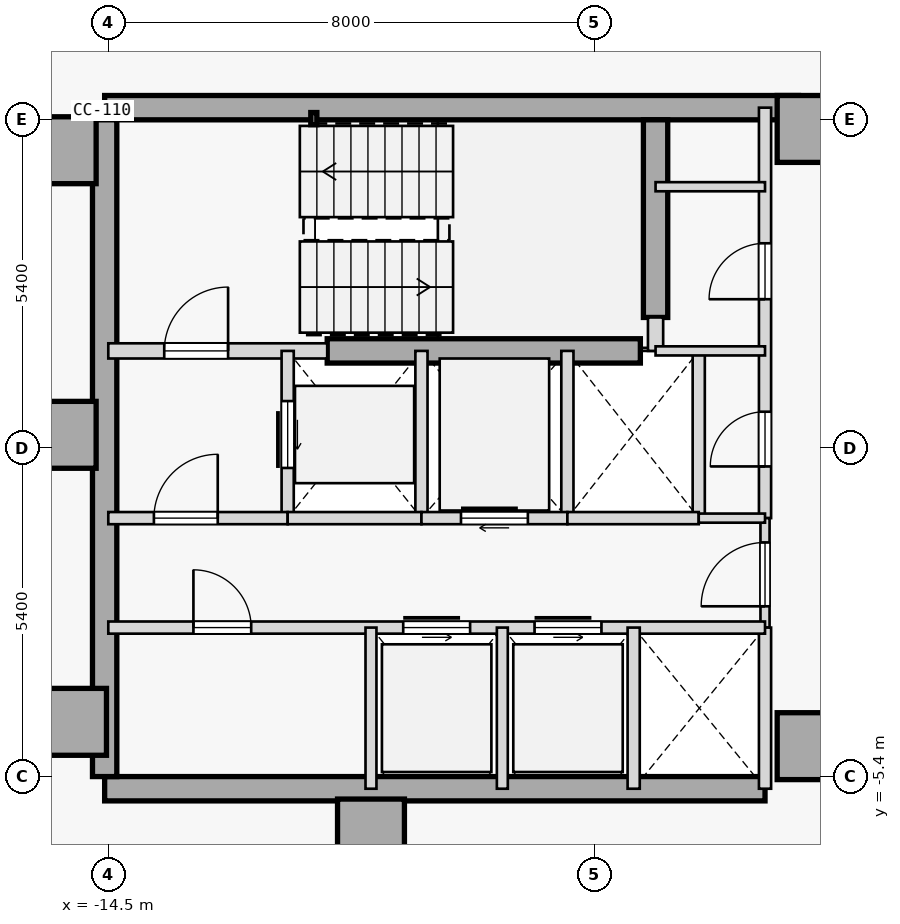
"""IFC4 building model, lengths in metres.
Left out: names, types, materials, properties, quantities, classifications, styles, units other than length and angle.
Written with IfcOpenShell. Run it as: python <this file> out.ifc"""

import sys

from ifc_helpers import new_model, si_unit, direction, frame, frame_2d, origin, origin_2d, place, context, subcontext, project, spatial, rectangle, hollow_rectangle, extrude, element, fill, save


model = new_model("IFC4")
c1 = context("Model", 3, precision=1e-05, world=origin(), true_north=direction((0.0, 1.0)))
c2 = subcontext(c1, "Body", "Model", "MODEL_VIEW")
j1 = project(units=[si_unit("LENGTHUNIT", "METRE"), si_unit("PLANEANGLEUNIT", "RADIAN")], contexts=[c1])
p1 = place(None, origin())
s1 = spatial("IfcSite", under=j1, at=p1, CompositionType="ELEMENT")
p2 = place(p1, origin())
s2 = spatial("IfcBuilding", under=s1, at=p2, CompositionType="ELEMENT")
p3 = place(p2, frame((0.0, 0.0, 171.8)))
s3 = spatial("IfcBuildingStorey", under=s2, at=p3, CompositionType="ELEMENT", Elevation=171.8)
for number, where, z_axis, x_axis in (
    (1, (-15.25, 4.9, 0.0), (0.0, 0.0, 1.0), (1.0, 0.0, 0.0)),
    (2, (-15.25, 0.22, 0.0), (0.0, 0.0, 1.0), (1.0, 0.0, 0.0)),
    (3, (-15.08, -4.5, 0.0), (0.0, 0.0, 1.0), (1.0, 0.0, 0.0)),
    (4, (-10.18, -6.32, 0.0), (0.0, 0.0, 1.0), (1.0, 0.0, 0.0)),
    (5, (-2.95, -4.9, 0.0), (0.0, 0.0, 1.0), (1.0, 0.0, 0.0)),
    (6, (-2.95, 5.25, 0.0), (0.0, 0.0, 1.0), (1.0, 0.0, 0.0)),
):
    element("IfcColumn", number, at=place(p3, frame(where, z_axis=z_axis, x_axis=x_axis)), inside=s3, PredefinedType="COLUMN", context=c2, shape_type="SweptSolid", body=[
        extrude(rectangle(XDim=1.1, YDim=1.1, at=origin_2d()), origin(), (0.0, 0.0, 1.0), 3.4),
    ])
p4 = place(p3, frame((-14.56, 5.6, 0.0), z_axis=(0.0, 0.0, 1.0), x_axis=(1.0, 0.0, 0.0)))
e7 = element("IfcWall", 7, at=p4, inside=s3, PredefinedType="SHEAR", context=c2, shape_type="SweptSolid", body=[
    extrude(rectangle(XDim=11.41, YDim=0.4, at=frame_2d((5.705, 0.0))), origin(), (0.0, 0.0, 1.0), 3.175),
])
p5 = place(p3, frame((-14.56, -5.6, 0.0), z_axis=(0.0, 0.0, 1.0), x_axis=(1.0, 0.0, 0.0)))
e8 = element("IfcWall", 8, at=p5, inside=s3, PredefinedType="SHEAR", context=c2, shape_type="SweptSolid", body=[
    extrude(rectangle(XDim=10.86, YDim=0.4, at=frame_2d((5.43, 0.0))), origin(), (0.0, 0.0, 1.0), 3.175),
])
p6 = place(p3, frame((-14.56, -5.4, 0.0), z_axis=(0.0, 0.0, 1.0), x_axis=(0.0, 1.0, 0.0)))
e9 = element("IfcWall", 9, at=p6, inside=s3, PredefinedType="SHEAR", context=c2, shape_type="SweptSolid", body=[
    extrude(rectangle(XDim=10.8, YDim=0.4, at=frame_2d((5.4, 0.0))), origin(), (0.0, 0.0, 1.0), 3.175),
])
p7 = place(p3, frame((-5.5, 2.15, 0.0), z_axis=(0.0, 0.0, 1.0), x_axis=(0.0, 1.0, 0.0)))
e10 = element("IfcWall", 10, at=p7, inside=s3, PredefinedType="SHEAR", context=c2, shape_type="SweptSolid", body=[
    extrude(rectangle(XDim=3.25, YDim=0.4, at=frame_2d((1.625, 0.0))), origin(), (0.0, 0.0, 1.0), 3.175),
])
p8 = place(p3, frame((-10.9, 1.6, 0.0), z_axis=(0.0, 0.0, 1.0), x_axis=(1.0, 0.0, 0.0)))
e11 = element("IfcWall", 11, at=p8, inside=s3, PredefinedType="SHEAR", context=c2, shape_type="SweptSolid", body=[
    extrude(rectangle(XDim=5.15, YDim=0.4, at=frame_2d((2.575, 0.0))), origin(), (0.0, 0.0, 1.0), 3.175),
])
p9 = place(p3, frame((-11.12, 5.42, 0.0), z_axis=(0.0, 0.0, 1.0), x_axis=(1.0, 0.0, 0.0)))
e12 = element("IfcColumn", 12, at=p9, inside=s3, PredefinedType="COLUMN", context=c2, shape_type="SweptSolid", body=[
    extrude(hollow_rectangle(XDim=0.1, YDim=0.2, WallThickness=0.008, at=origin_2d()), origin(), (0.0, 0.0, 1.0), 3.4),
])
p10 = place(p3, frame((-14.5, 1.6, 0.0), z_axis=(0.0, 0.0, 1.0), x_axis=(1.0, 0.0, 0.0)))
e13 = element("IfcWall", 13, at=p10, inside=s3, PredefinedType="STANDARD", context=c2, shape_type="SweptSolid", body=[
    extrude(rectangle(XDim=3.6, YDim=0.25, at=frame_2d((1.8, 0.0))), origin(), (0.0, 0.0, 1.0), 3.175),
])
p11 = place(p10, frame((0.92, 0.0, 0.0)))
e14 = element("IfcOpeningElement", 14, at=p11, cuts=e13, PredefinedType="OPENING", context=c2, shape_type="SweptSolid", body=[
    extrude(rectangle(XDim=1.05, YDim=2.15, at=frame_2d((0.525, 1.075))), frame((0.0, 0.135, 0.0), z_axis=(0.0, -1.0, 0.0), x_axis=(1.0, 0.0, 0.0)), (0.0, 0.0, 1.0), 0.27),
])
p12 = place(p3, frame((-5.5, 1.6, 0.0), z_axis=(0.0, 0.0, 1.0), x_axis=(0.0, 1.0, 0.0)))
e15 = element("IfcWall", 15, at=p12, inside=s3, PredefinedType="STANDARD", context=c2, shape_type="SweptSolid", body=[
    extrude(rectangle(XDim=0.55, YDim=0.25, at=frame_2d((0.275, 0.0))), origin(), (0.0, 0.0, 1.0), 3.175),
])
p13 = place(p3, frame((-3.7, -1.15, 0.0), z_axis=(0.0, 0.0, 1.0), x_axis=(0.0, 1.0, 0.0)))
e16 = element("IfcWall", 16, at=p13, inside=s3, PredefinedType="STANDARD", context=c2, shape_type="SweptSolid", body=[
    extrude(rectangle(XDim=6.75, YDim=0.2, at=frame_2d((3.375, 0.0))), origin(), (0.0, 0.0, 1.0), 3.175),
])
p14 = place(p13, frame((3.6, 0.0, 0.0)))
e17 = element("IfcOpeningElement", 17, at=p14, cuts=e16, PredefinedType="OPENING", context=c2, shape_type="SweptSolid", body=[
    extrude(rectangle(XDim=0.92, YDim=2.15, at=frame_2d((0.46, 1.075))), frame((0.0, 0.11, 0.0), z_axis=(0.0, -1.0, 0.0), x_axis=(1.0, 0.0, 0.0)), (0.0, 0.0, 1.0), 0.22),
])
p15 = place(p13, frame((0.85, 0.0, 0.0)))
e18 = element("IfcOpeningElement", 18, at=p15, cuts=e16, PredefinedType="OPENING", context=c2, shape_type="SweptSolid", body=[
    extrude(rectangle(XDim=0.9, YDim=2.15, at=frame_2d((0.45, 1.075))), frame((0.0, 0.11, 0.0), z_axis=(0.0, -1.0, 0.0), x_axis=(1.0, 0.0, 0.0)), (0.0, 0.0, 1.0), 0.22),
])
p16 = place(p3, frame((-3.7, -2.95, 0.0), z_axis=(0.0, 0.0, 1.0), x_axis=(0.0, 1.0, 0.0)))
e19 = element("IfcWall", 19, at=p16, inside=s3, PredefinedType="PARTITIONING", context=c2, shape_type="SweptSolid", body=[
    extrude(rectangle(XDim=1.8, YDim=0.15, at=frame_2d((0.9, 0.0))), origin(), (0.0, 0.0, 1.0), 3.175),
])
p17 = place(p16, frame((0.35, 0.0, 0.0)))
e20 = element("IfcOpeningElement", 20, at=p17, cuts=e19, PredefinedType="OPENING", context=c2, shape_type="SweptSolid", body=[
    extrude(rectangle(XDim=1.05, YDim=2.18, at=frame_2d((0.525, 1.09))), frame((0.0, 0.085, 0.0), z_axis=(0.0, -1.0, 0.0), x_axis=(1.0, 0.0, 0.0)), (0.0, 0.0, 1.0), 0.17),
])
p18 = place(p3, frame((-3.7, -5.6, 0.0), z_axis=(0.0, 0.0, 1.0), x_axis=(0.0, 1.0, 0.0)))
e21 = element("IfcWall", 21, at=p18, inside=s3, PredefinedType="STANDARD", context=c2, shape_type="SweptSolid", body=[
    extrude(rectangle(XDim=2.65, YDim=0.2, at=frame_2d((1.325, 0.0))), origin(), (0.0, 0.0, 1.0), 3.175),
])
p19 = place(p3, frame((-11.55, -1.15, 0.0), z_axis=(0.0, 0.0, 1.0), x_axis=(0.0, 1.0, 0.0)))
e22 = element("IfcWall", 22, at=p19, inside=s3, PredefinedType="STANDARD", context=c2, shape_type="SweptSolid", body=[
    extrude(rectangle(XDim=2.75, YDim=0.2, at=frame_2d((1.375, 0.0))), origin(), (0.0, 0.0, 1.0), 3.175),
])
p20 = place(p19, frame((0.825, 0.0, 0.0)))
e23 = element("IfcOpeningElement", 23, at=p20, cuts=e22, PredefinedType="OPENING", context=c2, shape_type="SweptSolid", body=[
    extrude(rectangle(XDim=1.1, YDim=2.15, at=frame_2d((0.55, 1.075))), frame((0.0, 0.11, 0.0), z_axis=(0.0, -1.0, 0.0), x_axis=(1.0, 0.0, 0.0)), (0.0, 0.0, 1.0), 0.22),
])
p21 = place(p3, frame((-9.35, -1.15, 0.0), z_axis=(0.0, 0.0, 1.0), x_axis=(0.0, 1.0, 0.0)))
e24 = element("IfcWall", 24, at=p21, inside=s3, PredefinedType="STANDARD", context=c2, shape_type="SweptSolid", body=[
    extrude(rectangle(XDim=2.75, YDim=0.2, at=frame_2d((1.375, 0.0))), origin(), (0.0, 0.0, 1.0), 3.175),
])
p22 = place(p3, frame((-14.5, -1.15, 0.0), z_axis=(0.0, 0.0, 1.0), x_axis=(1.0, 0.0, 0.0)))
e25 = element("IfcWall", 25, at=p22, inside=s3, PredefinedType="STANDARD", context=c2, shape_type="SweptSolid", body=[
    extrude(rectangle(XDim=2.95, YDim=0.2, at=frame_2d((1.475, 0.0))), origin(), (0.0, 0.0, 1.0), 3.175),
])
p23 = place(p22, frame((0.75, 0.0, 0.0)))
e26 = element("IfcOpeningElement", 26, at=p23, cuts=e25, PredefinedType="OPENING", context=c2, shape_type="SweptSolid", body=[
    extrude(rectangle(XDim=1.05, YDim=2.18, at=frame_2d((0.525, 1.09))), frame((0.0, 0.11, 0.0), z_axis=(0.0, -1.0, 0.0), x_axis=(1.0, 0.0, 0.0)), (0.0, 0.0, 1.0), 0.22),
])
p24 = place(p3, frame((-11.55, -1.15, 0.0), z_axis=(0.0, 0.0, 1.0), x_axis=(1.0, 0.0, 0.0)))
e27 = element("IfcWall", 27, at=p24, inside=s3, PredefinedType="STANDARD", context=c2, shape_type="SweptSolid", body=[
    extrude(rectangle(XDim=2.2, YDim=0.2, at=frame_2d((1.1, 0.0))), origin(), (0.0, 0.0, 1.0), 3.175),
])
p25 = place(p3, frame((-6.95, -1.15, 0.0), z_axis=(0.0, 0.0, 1.0), x_axis=(0.0, 1.0, 0.0)))
e28 = element("IfcWall", 28, at=p25, inside=s3, PredefinedType="STANDARD", context=c2, shape_type="SweptSolid", body=[
    extrude(rectangle(XDim=2.75, YDim=0.2, at=frame_2d((1.375, 0.0))), origin(), (0.0, 0.0, 1.0), 3.175),
])
p26 = place(p3, frame((-9.35, -1.15, 0.0), z_axis=(0.0, 0.0, 1.0), x_axis=(1.0, 0.0, 0.0)))
e29 = element("IfcWall", 29, at=p26, inside=s3, PredefinedType="STANDARD", context=c2, shape_type="SweptSolid", body=[
    extrude(rectangle(XDim=2.4, YDim=0.2, at=frame_2d((1.2, 0.0))), origin(), (0.0, 0.0, 1.0), 3.175),
])
p27 = place(p26, frame((0.65, 0.0, 0.0)))
e30 = element("IfcOpeningElement", 30, at=p27, cuts=e29, PredefinedType="OPENING", context=c2, shape_type="SweptSolid", body=[
    extrude(rectangle(XDim=1.1, YDim=2.15, at=frame_2d((0.55, 1.075))), frame((0.0, 0.11, 0.0), z_axis=(0.0, -1.0, 0.0), x_axis=(1.0, 0.0, 0.0)), (0.0, 0.0, 1.0), 0.22),
])
p28 = place(p3, frame((-4.79, -1.15, 0.0), z_axis=(0.0, 0.0, 1.0), x_axis=(0.0, 1.0, 0.0)))
e31 = element("IfcWall", 31, at=p28, inside=s3, PredefinedType="STANDARD", context=c2, shape_type="SweptSolid", body=[
    extrude(rectangle(XDim=2.75, YDim=0.2, at=frame_2d((1.375, 0.0))), origin(), (0.0, 0.0, 1.0), 3.175),
])
p29 = place(p3, frame((-6.95, -1.15, 0.0), z_axis=(0.0, 0.0, 1.0), x_axis=(1.0, 0.0, 0.0)))
e32 = element("IfcWall", 32, at=p29, inside=s3, PredefinedType="STANDARD", context=c2, shape_type="SweptSolid", body=[
    extrude(rectangle(XDim=2.16, YDim=0.2, at=frame_2d((1.08, 0.0))), origin(), (0.0, 0.0, 1.0), 3.175),
])
p30 = place(p3, frame((-4.79, -1.15, 0.0), z_axis=(0.0, 0.0, 1.0), x_axis=(1.0, 0.0, 0.0)))
e33 = element("IfcWall", 33, at=p30, inside=s3, PredefinedType="PARTITIONING", context=c2, shape_type="SweptSolid", body=[
    extrude(rectangle(XDim=1.09, YDim=0.15, at=frame_2d((0.545, 0.0))), origin(), (0.0, 0.0, 1.0), 3.175),
])
p31 = place(p3, frame((-14.5, -2.95, 0.0), z_axis=(0.0, 0.0, 1.0), x_axis=(1.0, 0.0, 0.0)))
e34 = element("IfcWall", 34, at=p31, inside=s3, PredefinedType="STANDARD", context=c2, shape_type="SweptSolid", body=[
    extrude(rectangle(XDim=10.8, YDim=0.2, at=frame_2d((5.4, 0.0))), origin(), (0.0, 0.0, 1.0), 3.175),
])
p32 = place(p31, frame((4.85, 0.0, 0.0)))
e35 = element("IfcOpeningElement", 35, at=p32, cuts=e34, PredefinedType="OPENING", context=c2, shape_type="SweptSolid", body=[
    extrude(rectangle(XDim=1.1, YDim=2.15, at=frame_2d((0.55, 1.075))), frame((0.0, 0.11, 0.0), z_axis=(0.0, -1.0, 0.0), x_axis=(1.0, 0.0, 0.0)), (0.0, 0.0, 1.0), 0.22),
])
p33 = place(p31, frame((7.01, 0.0, 0.0)))
e36 = element("IfcOpeningElement", 36, at=p33, cuts=e34, PredefinedType="OPENING", context=c2, shape_type="SweptSolid", body=[
    extrude(rectangle(XDim=1.1, YDim=2.15, at=frame_2d((0.55, 1.075))), frame((0.0, 0.11, 0.0), z_axis=(0.0, -1.0, 0.0), x_axis=(1.0, 0.0, 0.0)), (0.0, 0.0, 1.0), 0.22),
])
p34 = place(p31, frame((1.4, 0.0, 0.0)))
e37 = element("IfcOpeningElement", 37, at=p34, cuts=e34, PredefinedType="OPENING", context=c2, shape_type="SweptSolid", body=[
    extrude(rectangle(XDim=0.95, YDim=2.15, at=frame_2d((0.475, 1.075))), frame((0.0, 0.11, 0.0), z_axis=(0.0, -1.0, 0.0), x_axis=(1.0, 0.0, 0.0)), (0.0, 0.0, 1.0), 0.22),
])
p35 = place(p3, frame((-5.86, -5.6, 0.0), z_axis=(0.0, 0.0, 1.0), x_axis=(0.0, 1.0, 0.0)))
e38 = element("IfcWall", 38, at=p35, inside=s3, PredefinedType="STANDARD", context=c2, shape_type="SweptSolid", body=[
    extrude(rectangle(XDim=2.65, YDim=0.2, at=frame_2d((1.325, 0.0))), origin(), (0.0, 0.0, 1.0), 3.175),
])
for number, where, z_axis, x_axis in (
    (39, (-10.18, -5.6, 0.0), (0.0, 0.0, 1.0), (0.0, 1.0, 0.0)),
    (40, (-8.02, -5.6, 0.0), (0.0, 0.0, 1.0), (0.0, 1.0, 0.0)),
):
    element("IfcWall", number, at=place(p3, frame(where, z_axis=z_axis, x_axis=x_axis)), inside=s3, PredefinedType="STANDARD", context=c2, shape_type="SweptSolid", body=[
        extrude(rectangle(XDim=2.65, YDim=0.18, at=frame_2d((1.325, 0.0))), origin(), (0.0, 0.0, 1.0), 3.175),
    ])
for number, where, z_axis, x_axis in (
    (41, (-5.5, 4.3, 0.0), (0.0, 0.0, 1.0), (1.0, 0.0, 0.0)),
    (42, (-5.5, 1.6, 0.0), (0.0, 0.0, 1.0), (1.0, 0.0, 0.0)),
):
    element("IfcWall", number, at=place(p3, frame(where, z_axis=z_axis, x_axis=x_axis)), inside=s3, PredefinedType="PARTITIONING", context=c2, shape_type="SweptSolid", body=[
        extrude(rectangle(XDim=1.8, YDim=0.15, at=frame_2d((0.9, 0.0))), origin(), (0.0, 0.0, 1.0), 3.175),
    ])
p36 = place(p11, origin())
e43 = element("IfcDoor", 43, at=p36, inside=s3, OperationType="SINGLE_SWING_RIGHT", PredefinedType="DOOR", context=c2, shape_type="SweptSolid", body=[
    extrude(rectangle(XDim=1.05, YDim=2.15, at=frame_2d((0.525, 1.075))), frame((0.0, 0.025, 0.0), z_axis=(0.0, -1.0, 0.0), x_axis=(1.0, 0.0, 0.0)), (0.0, 0.0, 1.0), 0.05),
])
fill(e14, e43)
p37 = place(p23, origin())
e44 = element("IfcDoor", 44, at=p37, inside=s3, OperationType="SINGLE_SWING_RIGHT", PredefinedType="DOOR", context=c2, shape_type="SweptSolid", body=[
    extrude(rectangle(XDim=1.05, YDim=2.18, at=frame_2d((0.525, 1.09))), frame((0.0, 0.025, 0.0), z_axis=(0.0, -1.0, 0.0), x_axis=(1.0, 0.0, 0.0)), (0.0, 0.0, 1.0), 0.05),
])
fill(e26, e44)
p38 = place(p17, origin())
e45 = element("IfcDoor", 45, at=p38, inside=s3, OperationType="SINGLE_SWING_LEFT", PredefinedType="DOOR", context=c2, shape_type="SweptSolid", body=[
    extrude(rectangle(XDim=1.05, YDim=2.18, at=frame_2d((0.525, 1.09))), frame((0.0, 0.025, 0.0), z_axis=(0.0, -1.0, 0.0), x_axis=(1.0, 0.0, 0.0)), (0.0, 0.0, 1.0), 0.05),
])
fill(e20, e45)
p39 = place(p20, origin())
e46 = element("IfcDoor", 46, at=p39, inside=s3, OperationType="SLIDING_TO_RIGHT", PredefinedType="DOOR", context=c2, shape_type="SweptSolid", body=[
    extrude(rectangle(XDim=1.1, YDim=2.15, at=frame_2d((0.55, 1.075))), frame((0.0, 0.025, 0.0), z_axis=(0.0, -1.0, 0.0), x_axis=(1.0, 0.0, 0.0)), (0.0, 0.0, 1.0), 0.05),
])
fill(e23, e46)
p40 = place(p27, origin())
e47 = element("IfcDoor", 47, at=p40, inside=s3, OperationType="SLIDING_TO_RIGHT", PredefinedType="DOOR", context=c2, shape_type="SweptSolid", body=[
    extrude(rectangle(XDim=1.1, YDim=2.15, at=frame_2d((0.55, 1.075))), frame((0.0, 0.025, 0.0), z_axis=(0.0, -1.0, 0.0), x_axis=(1.0, 0.0, 0.0)), (0.0, 0.0, 1.0), 0.05),
])
fill(e30, e47)
p41 = place(p32, origin())
e48 = element("IfcDoor", 48, at=p41, inside=s3, OperationType="SLIDING_TO_LEFT", PredefinedType="DOOR", context=c2, shape_type="SweptSolid", body=[
    extrude(rectangle(XDim=1.1, YDim=2.15, at=frame_2d((0.55, 1.075))), frame((0.0, 0.025, 0.0), z_axis=(0.0, -1.0, 0.0), x_axis=(1.0, 0.0, 0.0)), (0.0, 0.0, 1.0), 0.05),
])
fill(e35, e48)
p42 = place(p33, origin())
e49 = element("IfcDoor", 49, at=p42, inside=s3, OperationType="SLIDING_TO_LEFT", PredefinedType="DOOR", context=c2, shape_type="SweptSolid", body=[
    extrude(rectangle(XDim=1.1, YDim=2.15, at=frame_2d((0.55, 1.075))), frame((0.0, 0.025, 0.0), z_axis=(0.0, -1.0, 0.0), x_axis=(1.0, 0.0, 0.0)), (0.0, 0.0, 1.0), 0.05),
])
fill(e36, e49)
p43 = place(p34, origin())
e50 = element("IfcDoor", 50, at=p43, inside=s3, OperationType="SINGLE_SWING_LEFT", PredefinedType="DOOR", context=c2, shape_type="SweptSolid", body=[
    extrude(rectangle(XDim=0.95, YDim=2.15, at=frame_2d((0.475, 1.075))), frame((0.0, 0.025, 0.0), z_axis=(0.0, -1.0, 0.0), x_axis=(1.0, 0.0, 0.0)), (0.0, 0.0, 1.0), 0.05),
])
fill(e37, e50)
p44 = place(p14, origin())
e51 = element("IfcDoor", 51, at=p44, inside=s3, OperationType="SINGLE_SWING_LEFT", PredefinedType="DOOR", context=c2, shape_type="SweptSolid", body=[
    extrude(rectangle(XDim=0.92, YDim=2.15, at=frame_2d((0.46, 1.075))), frame((0.0, 0.025, 0.0), z_axis=(0.0, -1.0, 0.0), x_axis=(1.0, 0.0, 0.0)), (0.0, 0.0, 1.0), 0.05),
])
fill(e17, e51)
p45 = place(p15, origin())
e52 = element("IfcDoor", 52, at=p45, inside=s3, OperationType="SINGLE_SWING_LEFT", PredefinedType="DOOR", context=c2, shape_type="SweptSolid", body=[
    extrude(rectangle(XDim=0.9, YDim=2.15, at=frame_2d((0.45, 1.075))), frame((0.0, 0.025, 0.0), z_axis=(0.0, -1.0, 0.0), x_axis=(1.0, 0.0, 0.0)), (0.0, 0.0, 1.0), 0.05),
])
fill(e18, e52)
save(model, sys.argv[1])
